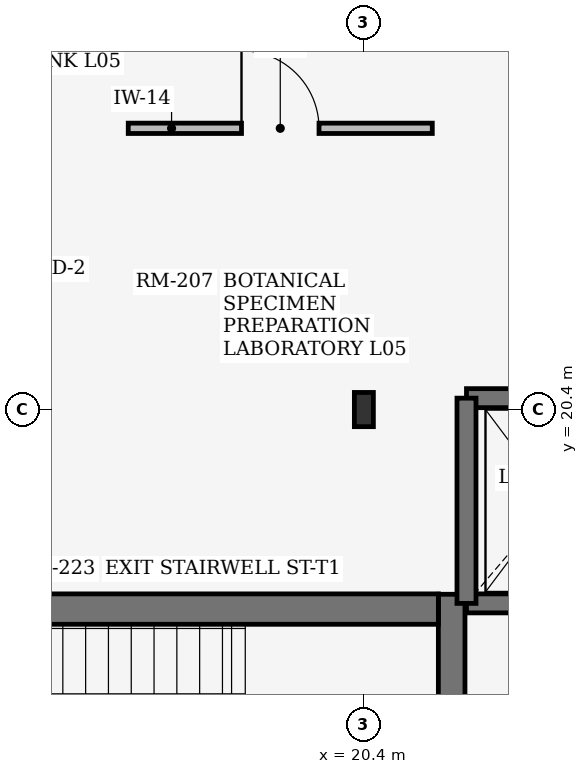
"""IFC4 building model, lengths in metres.
Left out: names, types, materials, properties, quantities, classifications, styles, units other than length and angle.
Written with IfcOpenShell. Run it as: python <this file> out.ifc"""

import sys

from ifc_helpers import new_model, si_unit, direction, frame, frame_2d, origin, origin_2d, place, context, subcontext, project, spatial, rectangle, i_section, extrude, element, fill, save


model = new_model("IFC4")
c1 = context("Model", 3, precision=1e-05, world=origin(), true_north=direction((0.0, 1.0)))
c2 = subcontext(c1, "Body", "Model", "MODEL_VIEW")
j1 = project(units=[si_unit("LENGTHUNIT", "METRE"), si_unit("PLANEANGLEUNIT", "RADIAN")], contexts=[c1])
p1 = place(None, origin())
s1 = spatial("IfcSite", under=j1, at=p1, CompositionType="ELEMENT")
p2 = place(p1, origin())
s2 = spatial("IfcBuilding", under=s1, at=p2, CompositionType="ELEMENT")
p3 = place(p2, frame((0.0, 0.0, 21.0)))
s3 = spatial("IfcBuildingStorey", under=s2, at=p3, CompositionType="ELEMENT", Elevation=21.0)
p4 = place(p3, frame((20.4, 20.4, 0.0), z_axis=(0.0, 0.0, 1.0), x_axis=(1.0, 0.0, 0.0)))
e1 = element("IfcColumn", 1, at=p4, inside=s3, PredefinedType="COLUMN", context=c2, shape_type="SweptSolid", body=[
    extrude(i_section(OverallWidth=0.25, OverallDepth=0.45, WebThickness=0.011, FlangeThickness=0.014, at=origin_2d()), origin(), (0.0, 0.0, 1.0), 3.67),
])
p5 = place(p3, frame((21.555, 13.38, 0.0), z_axis=(0.0, 0.0, 1.0), x_axis=(0.0, 1.0, 0.0)))
e2 = element("IfcWall", 2, at=p5, inside=s3, PredefinedType="SHEAR", context=c2, shape_type="SweptSolid", body=[
    extrude(rectangle(XDim=4.59, YDim=0.35, at=frame_2d((2.295, 0.0))), origin(), (0.0, 0.0, 1.0), 3.67),
])
p6 = place(p3, frame((13.4, 17.775, 0.0), z_axis=(0.0, 0.0, 1.0), x_axis=(1.0, 0.0, 0.0)))
e3 = element("IfcWall", 3, at=p6, inside=s3, PredefinedType="SHEAR", context=c2, shape_type="SweptSolid", body=[
    extrude(rectangle(XDim=7.98, YDim=0.4, at=frame_2d((3.99, 0.0))), origin(), (0.0, 0.0, 1.0), 3.67),
])
p7 = place(p3, frame((21.75, 17.85, 0.0), z_axis=(0.0, 0.0, 1.0), x_axis=(1.0, 0.0, 0.0)))
e4 = element("IfcWall", 4, at=p7, inside=s3, PredefinedType="SHEAR", context=c2, shape_type="SweptSolid", body=[
    extrude(rectangle(XDim=2.3, YDim=0.25, at=frame_2d((1.15, 0.0))), origin(), (0.0, 0.0, 1.0), 3.67),
])
p8 = place(p7, frame((0.6, 0.0, 0.0)))
e5 = element("IfcOpeningElement", 5, at=p8, cuts=e4, PredefinedType="OPENING", context=c2, shape_type="SweptSolid", body=[
    extrude(rectangle(XDim=1.1, YDim=2.2, at=frame_2d((0.55, 1.1))), frame((0.0, 0.135, 0.0), z_axis=(0.0, -1.0, 0.0), x_axis=(1.0, 0.0, 0.0)), (0.0, 0.0, 1.0), 0.27),
])
p9 = place(p3, frame((21.75, 20.55, 0.0), z_axis=(0.0, 0.0, 1.0), x_axis=(1.0, 0.0, 0.0)))
e6 = element("IfcWall", 6, at=p9, inside=s3, PredefinedType="SHEAR", context=c2, shape_type="SweptSolid", body=[
    extrude(rectangle(XDim=2.3, YDim=0.25, at=frame_2d((1.15, 0.0))), origin(), (0.0, 0.0, 1.0), 3.67),
])
p10 = place(p3, frame((21.75, 17.85, 0.0), z_axis=(0.0, 0.0, 1.0), x_axis=(0.0, 1.0, 0.0)))
e7 = element("IfcWall", 7, at=p10, inside=s3, PredefinedType="SHEAR", context=c2, shape_type="SweptSolid", body=[
    extrude(rectangle(XDim=2.7, YDim=0.25, at=frame_2d((1.35, 0.0))), origin(), (0.0, 0.0, 1.0), 3.67),
])
p11 = place(p3, frame((17.3, 24.1, 0.0), z_axis=(0.0, 0.0, 1.0), x_axis=(1.0, 0.0, 0.0)))
e8 = element("IfcWall", 8, at=p11, inside=s3, PredefinedType="PARTITIONING", context=c2, shape_type="SweptSolid", body=[
    extrude(rectangle(XDim=4.0, YDim=0.136, at=frame_2d((2.0, 0.0))), origin(), (0.0, 0.0, 1.0), 3.65),
])
p12 = place(p11, frame((1.49, 0.0, 0.0)))
e9 = element("IfcOpeningElement", 9, at=p12, cuts=e8, PredefinedType="OPENING", context=c2, shape_type="SweptSolid", body=[
    extrude(rectangle(XDim=1.02, YDim=2.18, at=frame_2d((0.51, 1.09))), frame((0.0, 0.078, 0.0), z_axis=(0.0, -1.0, 0.0), x_axis=(1.0, 0.0, 0.0)), (0.0, 0.0, 1.0), 0.156),
])
p13 = place(p12, origin())
e10 = element("IfcDoor", 10, at=p13, inside=s3, OperationType="SINGLE_SWING_LEFT", PredefinedType="DOOR", context=c2, shape_type="SweptSolid", body=[
    extrude(rectangle(XDim=1.02, YDim=2.18, at=frame_2d((0.51, 1.09))), frame((0.0, 0.025, 0.0), z_axis=(0.0, -1.0, 0.0), x_axis=(1.0, 0.0, 0.0)), (0.0, 0.0, 1.0), 0.05),
])
fill(e9, e10)
save(model, sys.argv[1])
